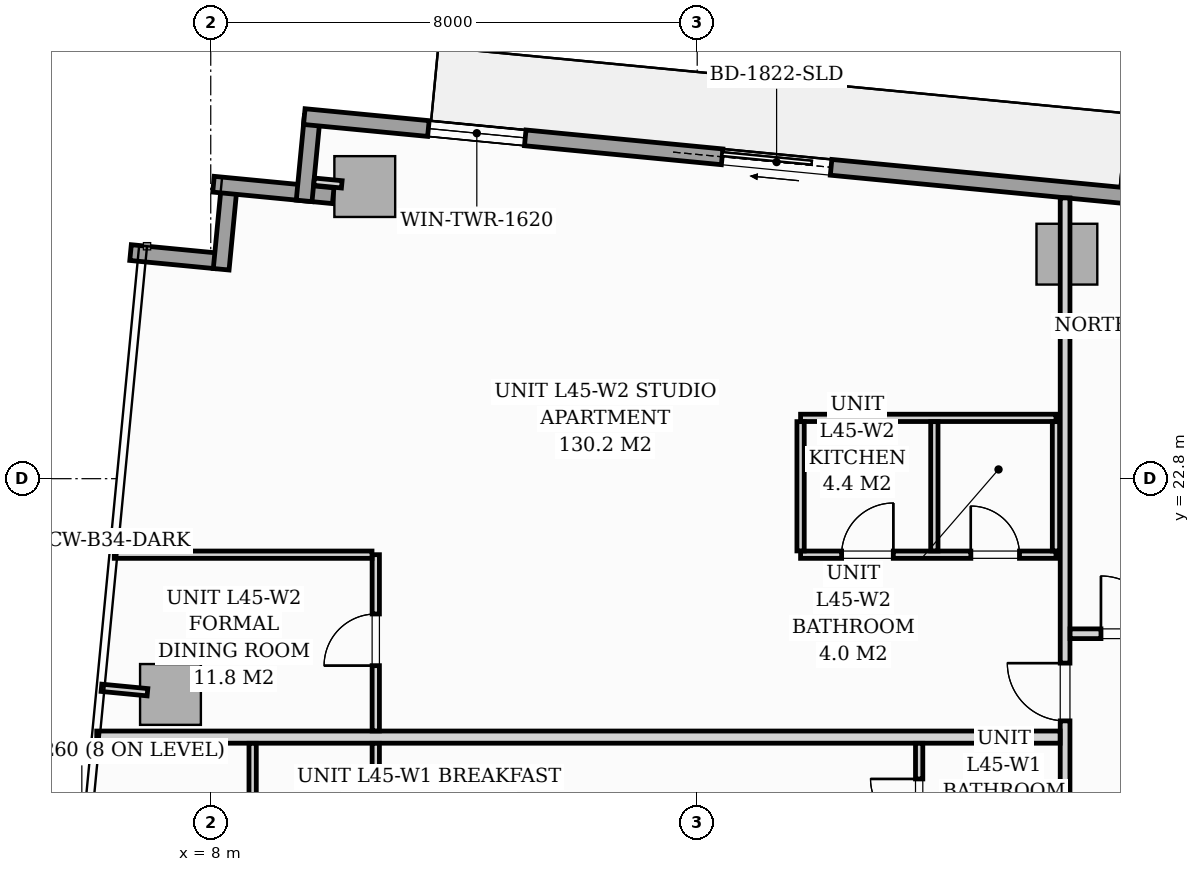
"""IFC4 building model, lengths in metres.
Left out: names, types, materials, properties, quantities, classifications, styles, units other than length and angle.
Written with IfcOpenShell. Run it as: python <this file> out.ifc"""

import sys

from ifc_helpers import new_model, si_unit, direction, frame, frame_2d, origin, origin_2d, place, context, subcontext, project, spatial, rectangle, extrude, source, transform, mapped, element, fill, save


model = new_model("IFC4")
c1 = context("Model", 3, precision=1e-05, world=origin(), true_north=direction((0.0, 1.0)))
c2 = subcontext(c1, "Body", "Model", "MODEL_VIEW")
j1 = project(units=[si_unit("LENGTHUNIT", "METRE"), si_unit("PLANEANGLEUNIT", "RADIAN")], contexts=[c1])
p1 = place(None, origin())
s1 = spatial("IfcSite", under=j1, at=p1, CompositionType="ELEMENT")
p2 = place(p1, origin())
s2 = spatial("IfcBuilding", under=s1, at=p2, CompositionType="ELEMENT")
p3 = place(p2, frame((0.0, 0.0, 156.6)))
s3 = spatial("IfcBuildingStorey", under=s2, at=p3, CompositionType="ELEMENT", Elevation=156.6)
m1 = source(origin(), c2, "Body", "SweptSolid", [
    extrude(rectangle(XDim=1.0, YDim=1.0, at=origin_2d()), origin(), (0.0, 0.0, 1.0), 3.196),
])
for number, where, z_axis, x_axis in (
    (1, (10.533, 27.604, 0.002), (0.0, 0.0, 1.0), (0.995, -0.096, 0.0)),
    (2, (22.08, 26.492, 0.002), (0.0, 0.0, 1.0), (0.995, -0.096, 0.0)),
    (3, (7.338, 19.252, 0.002), (0.0, 0.0, 1.0), (0.995, -0.096, 0.0)),
):
    element("IfcColumn", number, at=place(p3, frame(where, z_axis=z_axis, x_axis=x_axis)), inside=s3, PredefinedType="COLUMN", context=c2, shape_type="MappedRepresentation", body=[
        mapped(m1, transform((0.0, 0.0, 0.0), scale=1.0)),
    ])
p4 = place(p3, frame((6.681, 26.518, 0.0), z_axis=(0.0, 0.0, 1.0), x_axis=(0.995389446633, -0.095915846097, 0.0)))
e4 = element("IfcWall", 4, at=p4, inside=s3, PredefinedType="STANDARD", context=c2, shape_type="SweptSolid", body=[
    extrude(rectangle(XDim=1.395, YDim=0.26, at=frame_2d((0.697, 0.0))), origin(), (0.0, 0.0, 1.0), 2.94),
])
p5 = place(p3, frame((8.172, 26.244, 0.0), z_axis=(0.0, 0.0, 1.0), x_axis=(0.095725744959, 0.99540774648, 0.0)))
e5 = element("IfcWall", 5, at=p5, inside=s3, PredefinedType="STANDARD", context=c2, shape_type="SweptSolid", body=[
    extrude(rectangle(XDim=1.395, YDim=0.26, at=frame_2d((0.698, 0.0))), origin(), (0.0, 0.0, 1.0), 2.94),
])
p6 = place(p3, frame((8.045, 27.643, 0.0), z_axis=(0.0, 0.0, 1.0), x_axis=(0.995391147587, -0.095898192396, 0.0)))
e6 = element("IfcWall", 6, at=p6, inside=s3, PredefinedType="STANDARD", context=c2, shape_type="SweptSolid", body=[
    extrude(rectangle(XDim=1.978, YDim=0.26, at=frame_2d((0.989, 0.0))), origin(), (0.0, 0.0, 1.0), 2.94),
])
p7 = place(p3, frame((9.536, 27.368, 0.0), z_axis=(0.0, 0.0, 1.0), x_axis=(0.095915846097, 0.995389446633, 0.0)))
e7 = element("IfcWall", 7, at=p7, inside=s3, PredefinedType="STANDARD", context=c2, shape_type="SweptSolid", body=[
    extrude(rectangle(XDim=1.395, YDim=0.26, at=frame_2d((0.697, 0.0))), origin(), (0.0, 0.0, 1.0), 2.94),
])
p8 = place(p3, frame((9.539, 28.754, 0.0), z_axis=(0.0, 0.0, 1.0), x_axis=(0.995397345886, -0.09583383433, 0.0)))
e8 = element("IfcWall", 8, at=p8, inside=s3, PredefinedType="STANDARD", context=c2, shape_type="SweptSolid", body=[
    extrude(rectangle(XDim=17.01, YDim=0.26, at=frame_2d((8.505, 0.0))), origin(), (0.0, 0.0, 1.0), 2.94),
])
p9 = place(p8, frame((6.903, 0.0, 0.0)))
e9 = element("IfcOpeningElement", 9, at=p9, cuts=e8, PredefinedType="OPENING", context=c2, shape_type="SweptSolid", body=[
    extrude(rectangle(XDim=1.8, YDim=2.06, at=frame_2d((0.9, 1.03))), frame((0.0, 0.14, 0.0), z_axis=(0.0, -1.0, 0.0), x_axis=(1.0, 0.0, 0.0)), (0.0, 0.0, 1.0), 0.28),
])
p10 = place(p8, frame((2.05, 0.0, 0.65)))
e10 = element("IfcOpeningElement", 10, at=p10, cuts=e8, PredefinedType="OPENING", context=c2, shape_type="SweptSolid", body=[
    extrude(rectangle(XDim=1.6, YDim=1.5, at=frame_2d((0.8, 0.75))), frame((0.0, 0.14, 0.0), z_axis=(0.0, -1.0, 0.0), x_axis=(1.0, 0.0, 0.0)), (0.0, 0.0, 1.0), 0.28),
])
p11 = place(p3, frame((22.05, 12.732, 0.0), z_axis=(0.0, 0.0, 1.0), x_axis=(0.0, 1.0, 0.0)))
e11 = element("IfcWall", 11, at=p11, inside=s3, PredefinedType="PARTITIONING", context=c2, shape_type="SweptSolid", body=[
    extrude(rectangle(XDim=14.685, YDim=0.16, at=frame_2d((7.343, 0.0))), origin(), (0.0, 0.0, 1.0), 2.94),
])
p12 = place(p11, frame((0.493, 0.0, 0.0)))
e12 = element("IfcOpeningElement", 12, at=p12, cuts=e11, PredefinedType="OPENING", context=c2, shape_type="SweptSolid", body=[
    extrude(rectangle(XDim=0.95, YDim=2.06, at=frame_2d((0.475, 1.03))), frame((0.0, 0.09, 0.0), z_axis=(0.0, -1.0, 0.0), x_axis=(1.0, 0.0, 0.0)), (0.0, 0.0, 1.0), 0.18),
])
p13 = place(p11, frame((6.085, 0.0, 0.0)))
e13 = element("IfcOpeningElement", 13, at=p13, cuts=e11, PredefinedType="OPENING", context=c2, shape_type="SweptSolid", body=[
    extrude(rectangle(XDim=0.95, YDim=2.06, at=frame_2d((0.475, 1.03))), frame((0.0, 0.09, 0.0), z_axis=(0.0, -1.0, 0.0), x_axis=(1.0, 0.0, 0.0)), (0.0, 0.0, 1.0), 0.18),
])
p14 = place(p3, frame((6.125, 18.55, 0.0), z_axis=(0.0, 0.0, 1.0), x_axis=(1.0, 0.0, 0.0)))
e14 = element("IfcWall", 14, at=p14, inside=s3, PredefinedType="PARTITIONING", context=c2, shape_type="SweptSolid", body=[
    extrude(rectangle(XDim=15.843, YDim=0.2, at=frame_2d((7.921, 0.0))), origin(), (0.0, 0.0, 1.0), 2.063),
])
p15 = place(p3, frame((19.65, 14.5, 0.0), z_axis=(0.0, 0.0, 1.0), x_axis=(0.0, 1.0, 0.0)))
e15 = element("IfcWall", 15, at=p15, inside=s3, PredefinedType="PARTITIONING", context=c2, shape_type="SweptSolid", body=[
    extrude(rectangle(XDim=3.948, YDim=0.12, at=frame_2d((1.974, 0.0))), origin(), (0.0, 0.0, 1.0), 2.94),
])
p16 = place(p15, frame((0.563, 0.0, 0.0)))
e16 = element("IfcOpeningElement", 16, at=p16, cuts=e15, PredefinedType="OPENING", context=c2, shape_type="SweptSolid", body=[
    extrude(rectangle(XDim=0.85, YDim=2.05, at=frame_2d((0.425, 1.025))), frame((0.0, 0.07, 0.0), z_axis=(0.0, -1.0, 0.0), x_axis=(1.0, 0.0, 0.0)), (0.0, 0.0, 1.0), 0.14),
])
p17 = place(p15, frame((2.562, 0.0, 0.0)))
e17 = element("IfcOpeningElement", 17, at=p17, cuts=e15, PredefinedType="OPENING", context=c2, shape_type="SweptSolid", body=[
    extrude(rectangle(XDim=0.8, YDim=2.02, at=frame_2d((0.4, 1.01))), frame((0.0, 0.07, 0.0), z_axis=(0.0, -1.0, 0.0), x_axis=(1.0, 0.0, 0.0)), (0.0, 0.0, 1.0), 0.14),
])
p18 = place(p3, frame((8.689, 9.54, 0.0), z_axis=(0.0, 0.0, 1.0), x_axis=(0.0, 1.0, 0.0)))
e18 = element("IfcWall", 18, at=p18, inside=s3, PredefinedType="PARTITIONING", context=c2, shape_type="SweptSolid", body=[
    extrude(rectangle(XDim=8.908, YDim=0.12, at=frame_2d((4.454, 0.0))), origin(), (0.0, 0.0, 1.0), 2.382),
])
p19 = place(p18, frame((4.542, 0.0, 0.0)))
e19 = element("IfcOpeningElement", 19, at=p19, cuts=e18, PredefinedType="OPENING", context=c2, shape_type="SweptSolid", body=[
    extrude(rectangle(XDim=0.85, YDim=2.05, at=frame_2d((0.425, 1.025))), frame((0.0, 0.07, 0.0), z_axis=(0.0, -1.0, 0.0), x_axis=(1.0, 0.0, 0.0)), (0.0, 0.0, 1.0), 0.14),
])
p20 = place(p3, frame((17.7, 21.55, 0.0), z_axis=(0.0, 0.0, 1.0), x_axis=(1.0, 0.0, 0.0)))
e20 = element("IfcWall", 20, at=p20, inside=s3, PredefinedType="PARTITIONING", context=c2, shape_type="SweptSolid", body=[
    extrude(rectangle(XDim=4.2, YDim=0.12, at=frame_2d((2.1, 0.0))), origin(), (0.0, 0.0, 1.0), 2.94),
])
p21 = place(p20, frame((0.675, 0.0, 0.0)))
e21 = element("IfcOpeningElement", 21, at=p21, cuts=e20, PredefinedType="OPENING", context=c2, shape_type="SweptSolid", body=[
    extrude(rectangle(XDim=0.85, YDim=2.05, at=frame_2d((0.425, 1.025))), frame((0.0, 0.07, 0.0), z_axis=(0.0, -1.0, 0.0), x_axis=(1.0, 0.0, 0.0)), (0.0, 0.0, 1.0), 0.14),
])
p22 = place(p20, frame((2.8, 0.0, 0.0)))
e22 = element("IfcOpeningElement", 22, at=p22, cuts=e20, PredefinedType="OPENING", context=c2, shape_type="SweptSolid", body=[
    extrude(rectangle(XDim=0.8, YDim=2.02, at=frame_2d((0.4, 1.01))), frame((0.0, 0.07, 0.0), z_axis=(0.0, -1.0, 0.0), x_axis=(1.0, 0.0, 0.0)), (0.0, 0.0, 1.0), 0.14),
])
p23 = place(p3, frame((17.7, 23.8, 0.0), z_axis=(0.0, 0.0, 1.0), x_axis=(1.0, 0.0, 0.0)))
e23 = element("IfcWall", 23, at=p23, inside=s3, PredefinedType="PARTITIONING", context=c2, shape_type="SweptSolid", body=[
    extrude(rectangle(XDim=4.2, YDim=0.12, at=frame_2d((2.1, 0.0))), origin(), (0.0, 0.0, 1.0), 2.94),
])
for number, where, z_axis, x_axis in (
    (24, (17.7, 21.612, 0.0), (0.0, 0.0, 1.0), (0.0, 1.0, 0.0)),
    (25, (19.9, 21.612, 0.0), (0.0, 0.0, 1.0), (0.0, 1.0, 0.0)),
    (26, (21.9, 21.612, 0.0), (0.0, 0.0, 1.0), (0.0, 1.0, 0.0)),
):
    element("IfcWall", number, at=place(p3, frame(where, z_axis=z_axis, x_axis=x_axis)), inside=s3, PredefinedType="PARTITIONING", context=c2, shape_type="SweptSolid", body=[
        extrude(rectangle(XDim=2.126, YDim=0.12, at=frame_2d((1.063, 0.0))), origin(), (0.0, 0.0, 1.0), 2.94),
    ])
p24 = place(p3, frame((10.714, 18.05, 0.0), z_axis=(0.0, 0.0, 1.0), x_axis=(0.0, 1.0, 0.0)))
e27 = element("IfcWall", 27, at=p24, inside=s3, PredefinedType="PARTITIONING", context=c2, shape_type="SweptSolid", body=[
    extrude(rectangle(XDim=0.398, YDim=0.12, at=frame_2d((0.199, 0.0))), origin(), (0.0, 0.0, 1.0), 2.94),
])
p25 = place(p3, frame((10.714, 18.652, 0.0), z_axis=(0.0, 0.0, 1.0), x_axis=(0.0, 1.0, 0.0)))
e28 = element("IfcWall", 28, at=p25, inside=s3, PredefinedType="PARTITIONING", context=c2, shape_type="SweptSolid", body=[
    extrude(rectangle(XDim=2.898, YDim=0.12, at=frame_2d((1.449, 0.0))), origin(), (0.0, 0.0, 1.0), 2.94),
])
p26 = place(p25, frame((1.073, 0.0, 0.0)))
e29 = element("IfcOpeningElement", 29, at=p26, cuts=e28, PredefinedType="OPENING", context=c2, shape_type="SweptSolid", body=[
    extrude(rectangle(XDim=0.85, YDim=2.05, at=frame_2d((0.425, 1.025))), frame((0.0, 0.07, 0.0), z_axis=(0.0, -1.0, 0.0), x_axis=(1.0, 0.0, 0.0)), (0.0, 0.0, 1.0), 0.14),
])
p27 = place(p3, frame((6.414, 21.55, 0.0), z_axis=(0.0, 0.0, 1.0), x_axis=(1.0, 0.0, 0.0)))
e30 = element("IfcWall", 30, at=p27, inside=s3, PredefinedType="PARTITIONING", context=c2, shape_type="SweptSolid", body=[
    extrude(rectangle(XDim=4.238, YDim=0.12, at=frame_2d((2.119, 0.0))), origin(), (0.0, 0.0, 1.0), 2.94),
])
p28 = place(p3, frame((22.132, 20.25, 0.0), z_axis=(0.0, 0.0, 1.0), x_axis=(1.0, 0.0, 0.0)))
e31 = element("IfcWall", 31, at=p28, inside=s3, PredefinedType="PARTITIONING", context=c2, shape_type="SweptSolid", body=[
    extrude(rectangle(XDim=1.886, YDim=0.16, at=frame_2d((0.943, 0.0))), origin(), (0.0, 0.0, 1.0), 2.94),
])
p29 = place(p28, frame((0.508, 0.0, 0.0)))
e32 = element("IfcOpeningElement", 32, at=p29, cuts=e31, PredefinedType="OPENING", context=c2, shape_type="SweptSolid", body=[
    extrude(rectangle(XDim=0.95, YDim=2.06, at=frame_2d((0.475, 1.03))), frame((0.0, 0.09, 0.0), z_axis=(0.0, -1.0, 0.0), x_axis=(1.0, 0.0, 0.0)), (0.0, 0.0, 1.0), 0.18),
])
p30 = place(p3, frame((10.155, 27.64, 0.0), z_axis=(0.0, 0.0, 1.0), x_axis=(-0.995435366701, 0.095438098896, 0.0)))
e33 = element("IfcWall", 33, at=p30, inside=s3, PredefinedType="PARTITIONING", context=c2, shape_type="SweptSolid", body=[
    extrude(rectangle(XDim=0.458, YDim=0.12, at=frame_2d((0.229, 0.0))), origin(), (0.0, 0.0, 1.0), 2.94),
])
p31 = place(p3, frame((6.959, 19.288, 0.0), z_axis=(0.0, 0.0, 1.0), x_axis=(-0.995377786728, 0.096036772582, 0.0)))
e34 = element("IfcWall", 34, at=p31, inside=s3, PredefinedType="PARTITIONING", context=c2, shape_type="SweptSolid", body=[
    extrude(rectangle(XDim=0.76, YDim=0.12, at=frame_2d((0.38, 0.0))), origin(), (0.0, 0.0, 1.0), 2.94),
])
m2 = source(origin(), c2, "Body", "SweptSolid", [
    extrude(rectangle(XDim=1.8, YDim=2.06, at=frame_2d((0.9, 1.03))), frame((0.0, 0.025, 0.0), z_axis=(0.0, -1.0, 0.0), x_axis=(1.0, 0.0, 0.0)), (0.0, 0.0, 1.0), 0.05),
])
p32 = place(p9, origin())
e35 = element("IfcDoor", 35, at=p32, inside=s3, OperationType="SLIDING_TO_LEFT", PredefinedType="DOOR", context=c2, shape_type="MappedRepresentation", body=[
    mapped(m2, transform((0.0, 0.0, 0.0), scale=1.0)),
])
fill(e9, e35)
m3 = source(origin(), c2, "Body", "SweptSolid", [
    extrude(rectangle(XDim=1.6, YDim=1.5, at=frame_2d((0.8, 0.75))), frame((0.0, 0.03, 0.0), z_axis=(0.0, -1.0, 0.0), x_axis=(1.0, 0.0, 0.0)), (0.0, 0.0, 1.0), 0.06),
])
p33 = place(p10, origin())
e36 = element("IfcWindow", 36, at=p33, inside=s3, PartitioningType="SINGLE_PANEL", PredefinedType="WINDOW", context=c2, shape_type="MappedRepresentation", body=[
    mapped(m3, transform((0.0, 0.0, 0.0), scale=1.0)),
])
fill(e10, e36)
m4 = source(origin(), c2, "Body", "SweptSolid", [
    extrude(rectangle(XDim=0.8, YDim=2.02, at=frame_2d((0.4, 1.01))), frame((0.0, 0.025, 0.0), z_axis=(0.0, -1.0, 0.0), x_axis=(1.0, 0.0, 0.0)), (0.0, 0.0, 1.0), 0.05),
])
p34 = place(p17, origin())
e37 = element("IfcDoor", 37, at=p34, inside=s3, OperationType="SINGLE_SWING_RIGHT", PredefinedType="DOOR", context=c2, shape_type="MappedRepresentation", body=[
    mapped(m4, transform((0.0, 0.0, 0.0), scale=1.0)),
])
fill(e17, e37)
m5 = source(origin(), c2, "Body", "SweptSolid", [
    extrude(rectangle(XDim=0.95, YDim=2.06, at=frame_2d((0.475, 1.03))), frame((0.0, 0.025, 0.0), z_axis=(0.0, -1.0, 0.0), x_axis=(1.0, 0.0, 0.0)), (0.0, 0.0, 1.0), 0.05),
])
p35 = place(p13, origin())
e38 = element("IfcDoor", 38, at=p35, inside=s3, OperationType="SINGLE_SWING_RIGHT", PredefinedType="DOOR", context=c2, shape_type="MappedRepresentation", body=[
    mapped(m5, transform((0.0, 0.0, 0.0), scale=1.0)),
])
fill(e13, e38)
m6 = source(origin(), c2, "Body", "SweptSolid", [
    extrude(rectangle(XDim=0.85, YDim=2.05, at=frame_2d((0.425, 1.025))), frame((0.0, 0.025, 0.0), z_axis=(0.0, -1.0, 0.0), x_axis=(1.0, 0.0, 0.0)), (0.0, 0.0, 1.0), 0.05),
])
p36 = place(p26, origin())
e39 = element("IfcDoor", 39, at=p36, inside=s3, OperationType="SINGLE_SWING_LEFT", PredefinedType="DOOR", context=c2, shape_type="MappedRepresentation", body=[
    mapped(m6, transform((0.0, 0.0, 0.0), scale=1.0)),
])
fill(e29, e39)
p37 = place(p21, origin())
e40 = element("IfcDoor", 40, at=p37, inside=s3, OperationType="SINGLE_SWING_RIGHT", PredefinedType="DOOR", context=c2, shape_type="MappedRepresentation", body=[
    mapped(m6, transform((0.0, 0.0, 0.0), scale=1.0)),
])
fill(e21, e40)
p38 = place(p22, origin())
e41 = element("IfcDoor", 41, at=p38, inside=s3, OperationType="SINGLE_SWING_LEFT", PredefinedType="DOOR", context=c2, shape_type="MappedRepresentation", body=[
    mapped(m4, transform((0.0, 0.0, 0.0), scale=1.0)),
])
fill(e22, e41)
p39 = place(p29, origin())
e42 = element("IfcDoor", 42, at=p39, inside=s3, OperationType="SINGLE_SWING_LEFT", PredefinedType="DOOR", context=c2, shape_type="MappedRepresentation", body=[
    mapped(m5, transform((0.0, 0.0, 0.0), scale=1.0)),
])
fill(e32, e42)
save(model, sys.argv[1])
